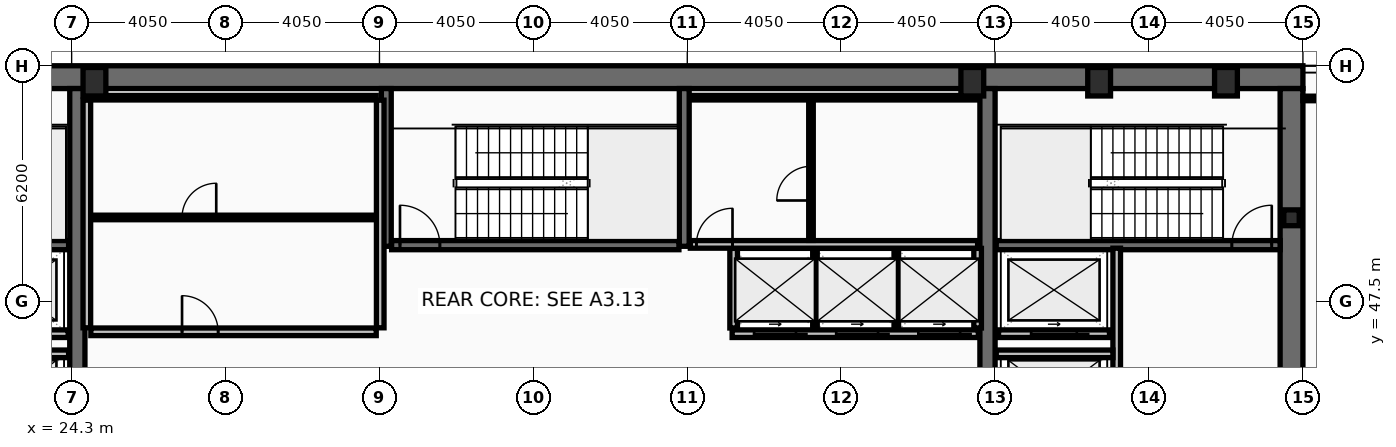
"""IFC4 building model, lengths in metres.
Left out: names, types, materials, properties, quantities, classifications, styles, units other than length and angle.
Written with IfcOpenShell. Run it as: python <this file> out.ifc"""

import sys

from ifc_helpers import new_model, si_unit, direction, frame, frame_2d, origin, origin_2d, place, context, subcontext, project, spatial, rectangle, hollow_rectangle, i_section, extrude, element, fill, save


model = new_model("IFC4")
c1 = context("Model", 3, precision=1e-05, world=origin(), true_north=direction((0.0, 1.0)))
c2 = subcontext(c1, "Body", "Model", "MODEL_VIEW")
j1 = project(units=[si_unit("LENGTHUNIT", "METRE"), si_unit("PLANEANGLEUNIT", "RADIAN")], contexts=[c1])
p1 = place(None, origin())
s1 = spatial("IfcSite", under=j1, at=p1, CompositionType="ELEMENT")
p2 = place(p1, origin())
s2 = spatial("IfcBuilding", under=s1, at=p2, CompositionType="ELEMENT")
p3 = place(p2, frame((0.0, 0.0, 265.4)))
s3 = spatial("IfcBuildingStorey", under=s2, at=p3, CompositionType="ELEMENT", Elevation=265.4)
p4 = place(p3, frame((16.2, 53.4, 0.0), z_axis=(0.0, 0.0, 1.0), x_axis=(1.0, 0.0, 0.0)))
e1 = element("IfcWall", 1, at=p4, inside=s3, PredefinedType="SHEAR", context=c2, shape_type="SweptSolid", body=[
    extrude(rectangle(XDim=40.5, YDim=0.6, at=frame_2d((20.25, 0.0))), origin(), (0.0, 0.0, 1.0), 4.24),
])
p5 = place(p3, frame((56.4, 53.1, 0.0), z_axis=(0.0, 0.0, 1.0), x_axis=(0.0, -1.0, 0.0)))
e2 = element("IfcWall", 2, at=p5, inside=s3, PredefinedType="SHEAR", context=c2, shape_type="SweptSolid", body=[
    extrude(rectangle(XDim=11.2, YDim=0.6, at=frame_2d((5.6, 0.0))), origin(), (0.0, 0.0, 1.0), 4.24),
])
for number, where, z_axis, x_axis in (
    (3, (24.45, 41.9, 0.0), (0.0, 0.0, 1.0), (0.0, 1.0, 0.0)),
    (4, (48.4, 41.9, 0.0), (0.0, 0.0, 1.0), (0.0, 1.0, 0.0)),
):
    element("IfcWall", number, at=place(p3, frame(where, z_axis=z_axis, x_axis=x_axis)), inside=s3, PredefinedType="SHEAR", context=c2, shape_type="SweptSolid", body=[
        extrude(rectangle(XDim=11.2, YDim=0.4, at=frame_2d((5.6, 0.0))), origin(), (0.0, 0.0, 1.0), 4.24),
    ])
for number, where, z_axis, x_axis in (
    (5, (32.58, 48.95, 0.0), (0.0, 0.0, 1.0), (0.0, 1.0, 0.0)),
    (6, (40.42, 48.95, 0.0), (0.0, 0.0, 1.0), (0.0, 1.0, 0.0)),
):
    element("IfcWall", number, at=place(p3, frame(where, z_axis=z_axis, x_axis=x_axis)), inside=s3, PredefinedType="SHEAR", context=c2, shape_type="SweptSolid", body=[
        extrude(rectangle(XDim=4.15, YDim=0.26, at=frame_2d((2.075, 0.0))), origin(), (0.0, 0.0, 1.0), 4.24),
    ])
p6 = place(p3, frame((16.8, 48.98, 0.0), z_axis=(0.0, 0.0, 1.0), x_axis=(1.0, 0.0, 0.0)))
e7 = element("IfcWall", 7, at=p6, inside=s3, PredefinedType="SHEAR", context=c2, shape_type="SweptSolid", body=[
    extrude(rectangle(XDim=7.42, YDim=0.24, at=frame_2d((3.71, 0.0))), origin(), (0.0, 0.0, 1.0), 4.24),
])
p7 = place(p6, frame((0.22, 0.0, 0.0)))
e8 = element("IfcOpeningElement", 8, at=p7, cuts=e7, PredefinedType="OPENING", context=c2, shape_type="SweptSolid", body=[
    extrude(rectangle(XDim=1.05, YDim=2.15, at=frame_2d((0.525, 1.075))), frame((0.0, 0.13, 0.0), z_axis=(0.0, -1.0, 0.0), x_axis=(1.0, 0.0, 0.0)), (0.0, 0.0, 1.0), 0.26),
])
p8 = place(p3, frame((48.63, 48.98, 0.0), z_axis=(0.0, 0.0, 1.0), x_axis=(1.0, 0.0, 0.0)))
e9 = element("IfcWall", 9, at=p8, inside=s3, PredefinedType="SHEAR", context=c2, shape_type="SweptSolid", body=[
    extrude(rectangle(XDim=7.47, YDim=0.24, at=frame_2d((3.735, 0.0))), origin(), (0.0, 0.0, 1.0), 4.24),
])
p9 = place(p8, frame((6.2, 0.0, 0.0)))
e10 = element("IfcOpeningElement", 10, at=p9, cuts=e9, PredefinedType="OPENING", context=c2, shape_type="SweptSolid", body=[
    extrude(rectangle(XDim=1.05, YDim=2.15, at=frame_2d((0.525, 1.075))), frame((0.0, 0.13, 0.0), z_axis=(0.0, -1.0, 0.0), x_axis=(1.0, 0.0, 0.0)), (0.0, 0.0, 1.0), 0.26),
])
p10 = place(p3, frame((32.72, 48.98, 0.0), z_axis=(0.0, 0.0, 1.0), x_axis=(1.0, 0.0, 0.0)))
e11 = element("IfcWall", 11, at=p10, inside=s3, PredefinedType="SHEAR", context=c2, shape_type="SweptSolid", body=[
    extrude(rectangle(XDim=7.56, YDim=0.24, at=frame_2d((3.78, 0.0))), origin(), (0.0, 0.0, 1.0), 4.24),
])
p11 = place(p10, frame((0.22, 0.0, 0.0)))
e12 = element("IfcOpeningElement", 12, at=p11, cuts=e11, PredefinedType="OPENING", context=c2, shape_type="SweptSolid", body=[
    extrude(rectangle(XDim=1.05, YDim=2.15, at=frame_2d((0.525, 1.075))), frame((0.0, 0.13, 0.0), z_axis=(0.0, -1.0, 0.0), x_axis=(1.0, 0.0, 0.0)), (0.0, 0.0, 1.0), 0.26),
])
for number, where, z_axis, x_axis in (
    (13, (24.9, 53.28, 0.0), (0.0, 0.0, 1.0), (1.0, 0.0, 0.0)),
    (14, (48.0, 53.28, 0.0), (0.0, 0.0, 1.0), (1.0, 0.0, 0.0)),
    (15, (51.337, 53.28, 0.0), (0.0, 0.0, 1.0), (1.0, 0.0, 0.0)),
    (16, (54.675, 53.28, 0.0), (0.0, 0.0, 1.0), (1.0, 0.0, 0.0)),
):
    element("IfcColumn", number, at=place(p3, frame(where, z_axis=z_axis, x_axis=x_axis)), inside=s3, PredefinedType="COLUMN", context=c2, shape_type="SweptSolid", body=[
        extrude(hollow_rectangle(XDim=0.6, YDim=0.75, WallThickness=0.045, at=origin_2d()), origin(), (0.0, 0.0, 1.0), 4.4),
    ])
p12 = place(p3, frame((56.4, 49.7, 0.0), z_axis=(0.0, 0.0, 1.0), x_axis=(1.0, 0.0, 0.0)))
e17 = element("IfcColumn", 17, at=p12, inside=s3, PredefinedType="COLUMN", context=c2, shape_type="SweptSolid", body=[
    extrude(i_section(OverallWidth=0.406, OverallDepth=0.416, WebThickness=0.03, FlangeThickness=0.048, at=origin_2d()), origin(), (0.0, 0.0, 1.0), 4.4),
])
p13 = place(p3, frame((51.61, 46.65, 0.0), z_axis=(0.0, 0.0, 1.0), x_axis=(-1.0, 0.0, 0.0)))
e18 = element("IfcWall", 18, at=p13, inside=s3, PredefinedType="PARTITIONING", context=c2, shape_type="SweptSolid", body=[
    extrude(rectangle(XDim=2.92, YDim=0.2, at=frame_2d((1.46, 0.0))), origin(), (0.0, 0.0, 1.0), 4.24),
])
p14 = place(p13, frame((0.86, 0.0, 0.0)))
e19 = element("IfcOpeningElement", 19, at=p14, cuts=e18, PredefinedType="OPENING", context=c2, shape_type="SweptSolid", body=[
    extrude(rectangle(XDim=1.2, YDim=2.18, at=frame_2d((0.6, 1.09))), frame((0.0, 0.11, 0.0), z_axis=(0.0, -1.0, 0.0), x_axis=(1.0, 0.0, 0.0)), (0.0, 0.0, 1.0), 0.22),
])
p15 = place(p3, frame((24.21, 46.65, 0.0), z_axis=(0.0, 0.0, 1.0), x_axis=(-1.0, 0.0, 0.0)))
e20 = element("IfcWall", 20, at=p15, inside=s3, PredefinedType="PARTITIONING", context=c2, shape_type="SweptSolid", body=[
    extrude(rectangle(XDim=2.97, YDim=0.2, at=frame_2d((1.485, 0.0))), origin(), (0.0, 0.0, 1.0), 4.24),
])
p16 = place(p15, frame((0.91, 0.0, 0.0)))
e21 = element("IfcOpeningElement", 21, at=p16, cuts=e20, PredefinedType="OPENING", context=c2, shape_type="SweptSolid", body=[
    extrude(rectangle(XDim=1.2, YDim=2.18, at=frame_2d((0.6, 1.09))), frame((0.0, 0.11, 0.0), z_axis=(0.0, -1.0, 0.0), x_axis=(1.0, 0.0, 0.0)), (0.0, 0.0, 1.0), 0.22),
])
p17 = place(p3, frame((48.16, 46.65, 0.0), z_axis=(0.0, 0.0, 1.0), x_axis=(-1.0, 0.0, 0.0)))
e22 = element("IfcWall", 22, at=p17, inside=s3, PredefinedType="PARTITIONING", context=c2, shape_type="SweptSolid", body=[
    extrude(rectangle(XDim=6.48, YDim=0.2, at=frame_2d((3.24, 0.0))), origin(), (0.0, 0.0, 1.0), 4.24),
])
p18 = place(p17, frame((4.8, 0.0, 0.0)))
e23 = element("IfcOpeningElement", 23, at=p18, cuts=e22, PredefinedType="OPENING", context=c2, shape_type="SweptSolid", body=[
    extrude(rectangle(XDim=1.1, YDim=2.18, at=frame_2d((0.55, 1.09))), frame((0.0, 0.11, 0.0), z_axis=(0.0, -1.0, 0.0), x_axis=(1.0, 0.0, 0.0)), (0.0, 0.0, 1.0), 0.22),
])
p19 = place(p17, frame((2.64, 0.0, 0.0)))
e24 = element("IfcOpeningElement", 24, at=p19, cuts=e22, PredefinedType="OPENING", context=c2, shape_type="SweptSolid", body=[
    extrude(rectangle(XDim=1.1, YDim=2.18, at=frame_2d((0.55, 1.09))), frame((0.0, 0.11, 0.0), z_axis=(0.0, -1.0, 0.0), x_axis=(1.0, 0.0, 0.0)), (0.0, 0.0, 1.0), 0.22),
])
p20 = place(p17, frame((0.48, 0.0, 0.0)))
e25 = element("IfcOpeningElement", 25, at=p20, cuts=e22, PredefinedType="OPENING", context=c2, shape_type="SweptSolid", body=[
    extrude(rectangle(XDim=1.1, YDim=2.18, at=frame_2d((0.55, 1.09))), frame((0.0, 0.11, 0.0), z_axis=(0.0, -1.0, 0.0), x_axis=(1.0, 0.0, 0.0)), (0.0, 0.0, 1.0), 0.22),
])
p21 = place(p3, frame((21.2, 46.12, 0.0), z_axis=(0.0, 0.0, 1.0), x_axis=(1.0, 0.0, 0.0)))
e26 = element("IfcWall", 26, at=p21, inside=s3, PredefinedType="PARTITIONING", context=c2, shape_type="SweptSolid", body=[
    extrude(rectangle(XDim=3.02, YDim=0.2, at=frame_2d((1.51, 0.0))), origin(), (0.0, 0.0, 1.0), 4.24),
])
p22 = place(p3, frame((51.8, 44.6, 0.0), z_axis=(0.0, 0.0, 1.0), x_axis=(0.0, 1.0, 0.0)))
e27 = element("IfcWall", 27, at=p22, inside=s3, PredefinedType="PARTITIONING", context=c2, shape_type="SweptSolid", body=[
    extrude(rectangle(XDim=4.3, YDim=0.2, at=frame_2d((2.15, 0.0))), origin(), (0.0, 0.0, 1.0), 4.24),
])
p23 = place(p3, frame((48.63, 46.12, 0.0), z_axis=(0.0, 0.0, 1.0), x_axis=(1.0, 0.0, 0.0)))
e28 = element("IfcWall", 28, at=p23, inside=s3, PredefinedType="PARTITIONING", context=c2, shape_type="SweptSolid", body=[
    extrude(rectangle(XDim=3.07, YDim=0.2, at=frame_2d((1.535, 0.0))), origin(), (0.0, 0.0, 1.0), 4.24),
])
for number, where, z_axis, x_axis in (
    (29, (24.7, 46.805, 0.0), (0.0, 0.0, 1.0), (0.0, 1.0, 0.0)),
    (30, (32.42, 46.805, 0.0), (0.0, 0.0, 1.0), (0.0, 1.0, 0.0)),
):
    element("IfcWall", number, at=place(p3, frame(where, z_axis=z_axis, x_axis=x_axis)), inside=s3, PredefinedType="PARTITIONING", context=c2, shape_type="SweptSolid", body=[
        extrude(rectangle(XDim=5.99, YDim=0.2, at=frame_2d((2.995, 0.0))), origin(), (0.0, 0.0, 1.0), 4.24),
    ])
p24 = place(p3, frame((24.805, 52.86, 0.0), z_axis=(0.0, 0.0, 1.0), x_axis=(1.0, 0.0, 0.0)))
e31 = element("IfcWall", 31, at=p24, inside=s3, PredefinedType="PARTITIONING", context=c2, shape_type="SweptSolid", body=[
    extrude(rectangle(XDim=7.51, YDim=0.12, at=frame_2d((3.755, 0.0))), origin(), (0.0, 0.0, 1.0), 4.24),
])
p25 = place(p3, frame((24.805, 49.709, 0.0), z_axis=(0.0, 0.0, 1.0), x_axis=(1.0, 0.0, 0.0)))
e32 = element("IfcWall", 32, at=p25, inside=s3, PredefinedType="PARTITIONING", context=c2, shape_type="SweptSolid", body=[
    extrude(rectangle(XDim=7.51, YDim=0.12, at=frame_2d((3.755, 0.0))), origin(), (0.0, 0.0, 1.0), 4.24),
])
p26 = place(p25, frame((2.4, 0.0, 0.0)))
e33 = element("IfcOpeningElement", 33, at=p26, cuts=e32, PredefinedType="OPENING", context=c2, shape_type="SweptSolid", body=[
    extrude(rectangle(XDim=0.9, YDim=2.05, at=frame_2d((0.45, 1.025))), frame((0.0, 0.07, 0.0), z_axis=(0.0, -1.0, 0.0), x_axis=(1.0, 0.0, 0.0)), (0.0, 0.0, 1.0), 0.14),
])
p27 = place(p3, frame((24.805, 46.7, 0.0), z_axis=(0.0, 0.0, 1.0), x_axis=(1.0, 0.0, 0.0)))
e34 = element("IfcWall", 34, at=p27, inside=s3, PredefinedType="PARTITIONING", context=c2, shape_type="SweptSolid", body=[
    extrude(rectangle(XDim=7.51, YDim=0.2, at=frame_2d((3.755, 0.0))), origin(), (0.0, 0.0, 1.0), 4.24),
])
p28 = place(p27, frame((2.4, 0.0, 0.0)))
e35 = element("IfcOpeningElement", 35, at=p28, cuts=e34, PredefinedType="OPENING", context=c2, shape_type="SweptSolid", body=[
    extrude(rectangle(XDim=0.95, YDim=2.1, at=frame_2d((0.475, 1.05))), frame((0.0, 0.11, 0.0), z_axis=(0.0, -1.0, 0.0), x_axis=(1.0, 0.0, 0.0)), (0.0, 0.0, 1.0), 0.22),
])
for number, where, z_axis, x_axis in (
    (36, (41.72, 46.8, 0.0), (0.0, 0.0, 1.0), (0.0, 1.0, 0.0)),
    (37, (48.14, 46.8, 0.0), (0.0, 0.0, 1.0), (0.0, 1.0, 0.0)),
):
    element("IfcWall", number, at=place(p3, frame(where, z_axis=z_axis, x_axis=x_axis)), inside=s3, PredefinedType="PARTITIONING", context=c2, shape_type="SweptSolid", body=[
        extrude(rectangle(XDim=2.095, YDim=0.2, at=frame_2d((1.047, 0.0))), origin(), (0.0, 0.0, 1.0), 4.24),
    ])
for number, where, z_axis, x_axis in (
    (38, (43.86, 46.8, 0.0), (0.0, 0.0, 1.0), (0.0, 1.0, 0.0)),
    (39, (46.0, 46.8, 0.0), (0.0, 0.0, 1.0), (0.0, 1.0, 0.0)),
):
    element("IfcWall", number, at=place(p3, frame(where, z_axis=z_axis, x_axis=x_axis)), inside=s3, PredefinedType="PARTITIONING", context=c2, shape_type="SweptSolid", body=[
        extrude(rectangle(XDim=2.095, YDim=0.12, at=frame_2d((1.047, 0.0))), origin(), (0.0, 0.0, 1.0), 4.24),
    ])
p29 = place(p3, frame((40.58, 52.86, 0.0), z_axis=(0.0, 0.0, 1.0), x_axis=(1.0, 0.0, 0.0)))
e40 = element("IfcWall", 40, at=p29, inside=s3, PredefinedType="PARTITIONING", context=c2, shape_type="SweptSolid", body=[
    extrude(rectangle(XDim=7.56, YDim=0.12, at=frame_2d((3.78, 0.0))), origin(), (0.0, 0.0, 1.0), 4.24),
])
p30 = place(p3, frame((40.58, 49.0, 0.0), z_axis=(0.0, 0.0, 1.0), x_axis=(1.0, 0.0, 0.0)))
e41 = element("IfcWall", 41, at=p30, inside=s3, PredefinedType="PARTITIONING", context=c2, shape_type="SweptSolid", body=[
    extrude(rectangle(XDim=7.56, YDim=0.2, at=frame_2d((3.78, 0.0))), origin(), (0.0, 0.0, 1.0), 4.24),
])
p31 = place(p30, frame((0.16, 0.0, 0.0)))
e42 = element("IfcOpeningElement", 42, at=p31, cuts=e41, PredefinedType="OPENING", context=c2, shape_type="SweptSolid", body=[
    extrude(rectangle(XDim=0.95, YDim=2.1, at=frame_2d((0.475, 1.05))), frame((0.0, 0.11, 0.0), z_axis=(0.0, -1.0, 0.0), x_axis=(1.0, 0.0, 0.0)), (0.0, 0.0, 1.0), 0.22),
])
p32 = place(p3, frame((43.755, 49.105, 0.0), z_axis=(0.0, 0.0, 1.0), x_axis=(0.0, 1.0, 0.0)))
e43 = element("IfcWall", 43, at=p32, inside=s3, PredefinedType="PARTITIONING", context=c2, shape_type="SweptSolid", body=[
    extrude(rectangle(XDim=3.69, YDim=0.12, at=frame_2d((1.845, 0.0))), origin(), (0.0, 0.0, 1.0), 4.24),
])
p33 = place(p32, frame((1.05, 0.0, 0.0)))
e44 = element("IfcOpeningElement", 44, at=p33, cuts=e43, PredefinedType="OPENING", context=c2, shape_type="SweptSolid", body=[
    extrude(rectangle(XDim=0.9, YDim=2.05, at=frame_2d((0.45, 1.025))), frame((0.0, 0.07, 0.0), z_axis=(0.0, -1.0, 0.0), x_axis=(1.0, 0.0, 0.0)), (0.0, 0.0, 1.0), 0.14),
])
p34 = place(p3, frame((56.7, 52.84, 0.0), z_axis=(0.0, 0.0, 1.0), x_axis=(1.0, 0.0, 0.0)))
e45 = element("IfcWall", 45, at=p34, inside=s3, PredefinedType="PARTITIONING", context=c2, shape_type="SweptSolid", body=[
    extrude(rectangle(XDim=6.105, YDim=0.12, at=frame_2d((3.052, 0.0))), origin(), (0.0, 0.0, 1.0), 4.24),
])
p35 = place(p9, origin())
e46 = element("IfcDoor", 46, at=p35, inside=s3, OperationType="SINGLE_SWING_RIGHT", PredefinedType="DOOR", context=c2, shape_type="SweptSolid", body=[
    extrude(rectangle(XDim=1.05, YDim=2.15, at=frame_2d((0.525, 1.075))), frame((0.0, 0.025, 0.0), z_axis=(0.0, -1.0, 0.0), x_axis=(1.0, 0.0, 0.0)), (0.0, 0.0, 1.0), 0.05),
])
fill(e10, e46)
p36 = place(p11, origin())
e47 = element("IfcDoor", 47, at=p36, inside=s3, OperationType="SINGLE_SWING_LEFT", PredefinedType="DOOR", context=c2, shape_type="SweptSolid", body=[
    extrude(rectangle(XDim=1.05, YDim=2.15, at=frame_2d((0.525, 1.075))), frame((0.0, 0.025, 0.0), z_axis=(0.0, -1.0, 0.0), x_axis=(1.0, 0.0, 0.0)), (0.0, 0.0, 1.0), 0.05),
])
fill(e12, e47)
p37 = place(p14, origin())
e48 = element("IfcDoor", 48, at=p37, inside=s3, OperationType="SLIDING_TO_LEFT", PredefinedType="DOOR", context=c2, shape_type="SweptSolid", body=[
    extrude(rectangle(XDim=1.2, YDim=2.18, at=frame_2d((0.6, 1.09))), frame((0.0, 0.025, 0.0), z_axis=(0.0, -1.0, 0.0), x_axis=(1.0, 0.0, 0.0)), (0.0, 0.0, 1.0), 0.05),
])
fill(e19, e48)
p38 = place(p18, origin())
e49 = element("IfcDoor", 49, at=p38, inside=s3, OperationType="SLIDING_TO_LEFT", PredefinedType="DOOR", context=c2, shape_type="SweptSolid", body=[
    extrude(rectangle(XDim=1.1, YDim=2.18, at=frame_2d((0.55, 1.09))), frame((0.0, 0.025, 0.0), z_axis=(0.0, -1.0, 0.0), x_axis=(1.0, 0.0, 0.0)), (0.0, 0.0, 1.0), 0.05),
])
fill(e23, e49)
p39 = place(p19, origin())
e50 = element("IfcDoor", 50, at=p39, inside=s3, OperationType="SLIDING_TO_LEFT", PredefinedType="DOOR", context=c2, shape_type="SweptSolid", body=[
    extrude(rectangle(XDim=1.1, YDim=2.18, at=frame_2d((0.55, 1.09))), frame((0.0, 0.025, 0.0), z_axis=(0.0, -1.0, 0.0), x_axis=(1.0, 0.0, 0.0)), (0.0, 0.0, 1.0), 0.05),
])
fill(e24, e50)
p40 = place(p20, origin())
e51 = element("IfcDoor", 51, at=p40, inside=s3, OperationType="SLIDING_TO_LEFT", PredefinedType="DOOR", context=c2, shape_type="SweptSolid", body=[
    extrude(rectangle(XDim=1.1, YDim=2.18, at=frame_2d((0.55, 1.09))), frame((0.0, 0.025, 0.0), z_axis=(0.0, -1.0, 0.0), x_axis=(1.0, 0.0, 0.0)), (0.0, 0.0, 1.0), 0.05),
])
fill(e25, e51)
p41 = place(p26, origin())
e52 = element("IfcDoor", 52, at=p41, inside=s3, OperationType="SINGLE_SWING_RIGHT", PredefinedType="DOOR", context=c2, shape_type="SweptSolid", body=[
    extrude(rectangle(XDim=0.9, YDim=2.05, at=frame_2d((0.45, 1.025))), frame((0.0, 0.025, 0.0), z_axis=(0.0, -1.0, 0.0), x_axis=(1.0, 0.0, 0.0)), (0.0, 0.0, 1.0), 0.05),
])
fill(e33, e52)
p42 = place(p28, origin())
e53 = element("IfcDoor", 53, at=p42, inside=s3, OperationType="SINGLE_SWING_LEFT", PredefinedType="DOOR", context=c2, shape_type="SweptSolid", body=[
    extrude(rectangle(XDim=0.95, YDim=2.1, at=frame_2d((0.475, 1.05))), frame((0.0, 0.025, 0.0), z_axis=(0.0, -1.0, 0.0), x_axis=(1.0, 0.0, 0.0)), (0.0, 0.0, 1.0), 0.05),
])
fill(e35, e53)
p43 = place(p31, origin())
e54 = element("IfcDoor", 54, at=p43, inside=s3, OperationType="SINGLE_SWING_RIGHT", PredefinedType="DOOR", context=c2, shape_type="SweptSolid", body=[
    extrude(rectangle(XDim=0.95, YDim=2.1, at=frame_2d((0.475, 1.05))), frame((0.0, 0.025, 0.0), z_axis=(0.0, -1.0, 0.0), x_axis=(1.0, 0.0, 0.0)), (0.0, 0.0, 1.0), 0.05),
])
fill(e42, e54)
p44 = place(p33, origin())
e55 = element("IfcDoor", 55, at=p44, inside=s3, OperationType="SINGLE_SWING_LEFT", PredefinedType="DOOR", context=c2, shape_type="SweptSolid", body=[
    extrude(rectangle(XDim=0.9, YDim=2.05, at=frame_2d((0.45, 1.025))), frame((0.0, 0.025, 0.0), z_axis=(0.0, -1.0, 0.0), x_axis=(1.0, 0.0, 0.0)), (0.0, 0.0, 1.0), 0.05),
])
fill(e44, e55)
save(model, sys.argv[1])
